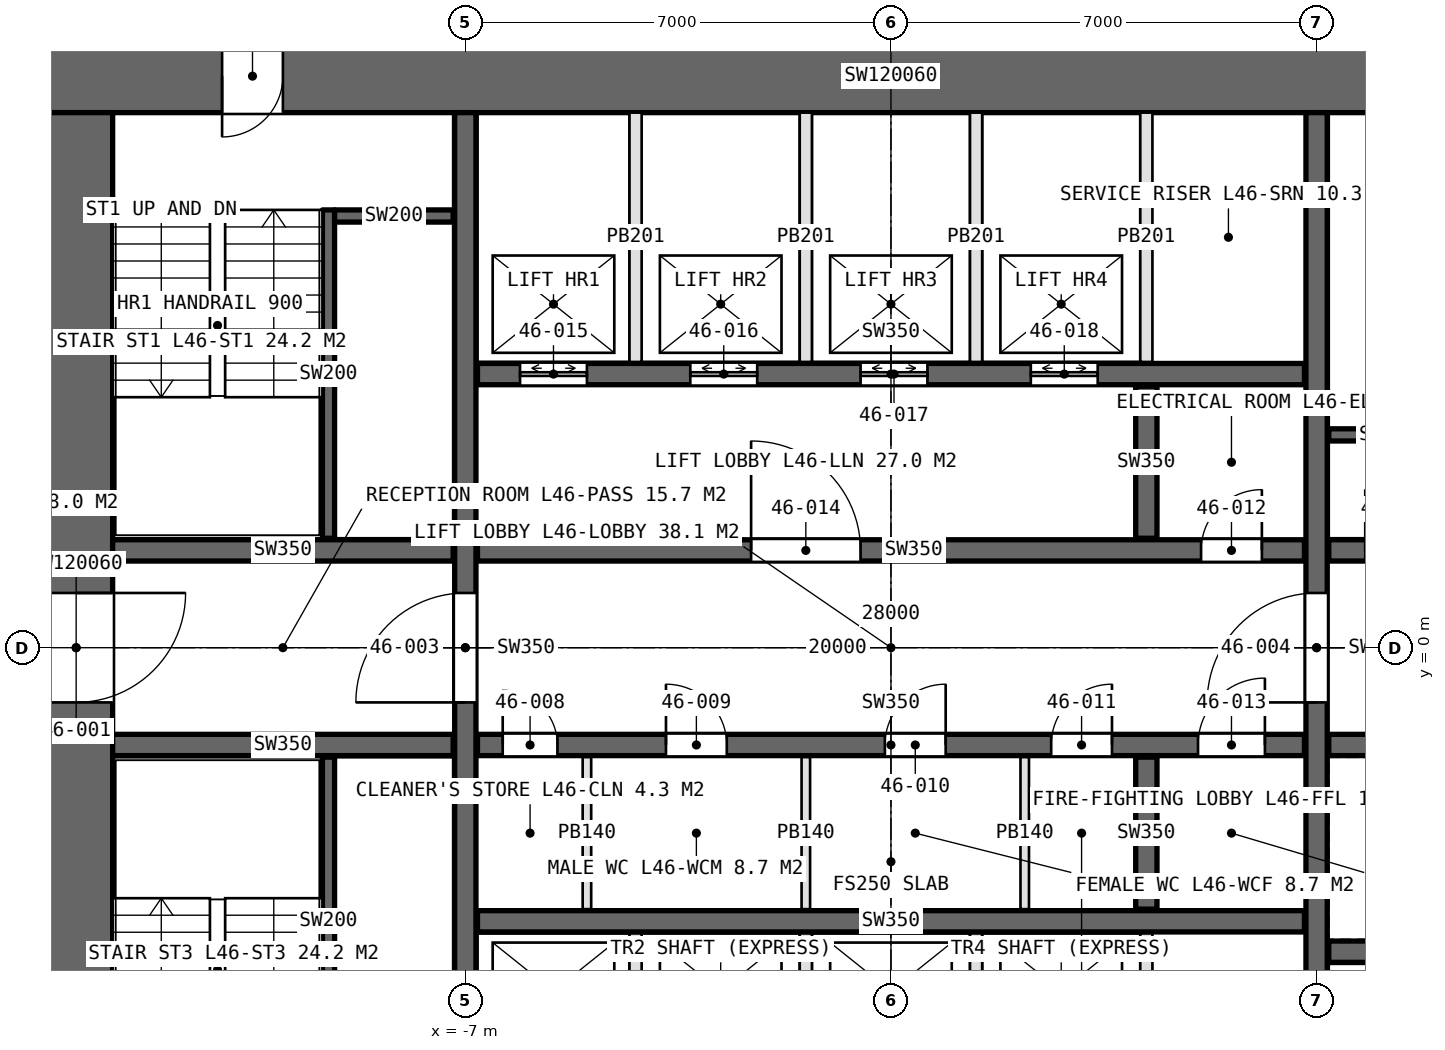
"""IFC4 building model, lengths in metres.
Left out: names, types, materials, properties, quantities, classifications, styles, units other than length and angle.
Written with IfcOpenShell. Run it as: python <this file> out.ifc"""

import sys

from ifc_helpers import new_model, si_unit, direction, frame, frame_2d, origin, place, context, subcontext, project, spatial, rectangle, extrude, element, fill, save


model = new_model("IFC4")
c1 = context("Model", 3, precision=1e-05, world=origin(), true_north=direction((0.0, 1.0)))
c2 = subcontext(c1, "Body", "Model", "MODEL_VIEW")
j1 = project(units=[si_unit("LENGTHUNIT", "METRE"), si_unit("PLANEANGLEUNIT", "RADIAN")], contexts=[c1])
p1 = place(None, origin())
s1 = spatial("IfcSite", under=j1, at=p1, CompositionType="ELEMENT")
p2 = place(p1, origin())
s2 = spatial("IfcBuilding", under=s1, at=p2, CompositionType="ELEMENT")
p3 = place(p2, frame((0.0, 0.0, 211.6)))
s3 = spatial("IfcBuildingStorey", under=s2, at=p3, CompositionType="ELEMENT", Elevation=211.6)
p4 = place(p3, frame((14.0, 9.4, 0.0), z_axis=(0.0, 0.0, 1.0), x_axis=(-1.0, 0.0, 0.0)))
e1 = element("IfcWall", 1, at=p4, inside=s3, PredefinedType="SHEAR", context=c2, shape_type="SweptSolid", body=[
    extrude(rectangle(XDim=28.0, YDim=1.2, at=frame_2d((14.0, 0.0))), origin(), (0.0, 0.0, 1.0), 4.2),
])
p5 = place(p4, frame((24.0, 0.0, 0.0)))
e2 = element("IfcOpeningElement", 2, at=p5, cuts=e1, PredefinedType="OPENING", context=c2, shape_type="SweptSolid", body=[
    extrude(rectangle(XDim=1.0, YDim=2.4, at=frame_2d((0.5, 1.2))), frame((0.0, 0.61, 0.0), z_axis=(0.0, -1.0, 0.0), x_axis=(1.0, 0.0, 0.0)), (0.0, 0.0, 1.0), 1.22),
])
p6 = place(p3, frame((-13.4, 8.8, 0.0), z_axis=(0.0, 0.0, 1.0), x_axis=(0.0, -1.0, 0.0)))
e3 = element("IfcWall", 3, at=p6, inside=s3, PredefinedType="SHEAR", context=c2, shape_type="SweptSolid", body=[
    extrude(rectangle(XDim=17.6, YDim=1.2, at=frame_2d((8.8, 0.0))), origin(), (0.0, 0.0, 1.0), 4.2),
])
p7 = place(p6, frame((7.9, 0.0, 0.0)))
e4 = element("IfcOpeningElement", 4, at=p7, cuts=e3, PredefinedType="OPENING", context=c2, shape_type="SweptSolid", body=[
    extrude(rectangle(XDim=1.8, YDim=2.4, at=frame_2d((0.9, 1.2))), frame((0.0, 0.61, 0.0), z_axis=(0.0, -1.0, 0.0), x_axis=(1.0, 0.0, 0.0)), (0.0, 0.0, 1.0), 1.22),
])
p8 = place(p6, frame((16.5, 0.0, 0.0)))
e5 = element("IfcOpeningElement", 5, at=p8, cuts=e3, PredefinedType="OPENING", context=c2, shape_type="SweptSolid", body=[
    extrude(rectangle(XDim=1.0, YDim=2.4, at=frame_2d((0.5, 1.2))), frame((0.0, 0.61, 0.0), z_axis=(0.0, -1.0, 0.0), x_axis=(1.0, 0.0, 0.0)), (0.0, 0.0, 1.0), 1.22),
])
p9 = place(p3, frame((-7.0, -8.8, 0.0), z_axis=(0.0, 0.0, 1.0), x_axis=(0.0, 1.0, 0.0)))
e6 = element("IfcWall", 6, at=p9, inside=s3, PredefinedType="SHEAR", context=c2, shape_type="SweptSolid", body=[
    extrude(rectangle(XDim=17.6, YDim=0.35, at=frame_2d((8.8, 0.0))), origin(), (0.0, 0.0, 1.0), 4.2),
])
p10 = place(p9, frame((7.9, 0.0, 0.0)))
e7 = element("IfcOpeningElement", 7, at=p10, cuts=e6, PredefinedType="OPENING", context=c2, shape_type="SweptSolid", body=[
    extrude(rectangle(XDim=1.8, YDim=2.4, at=frame_2d((0.9, 1.2))), frame((0.0, 0.185, 0.0), z_axis=(0.0, -1.0, 0.0), x_axis=(1.0, 0.0, 0.0)), (0.0, 0.0, 1.0), 0.37),
])
p11 = place(p3, frame((7.0, -8.8, 0.0), z_axis=(0.0, 0.0, 1.0), x_axis=(0.0, 1.0, 0.0)))
e8 = element("IfcWall", 8, at=p11, inside=s3, PredefinedType="SHEAR", context=c2, shape_type="SweptSolid", body=[
    extrude(rectangle(XDim=17.6, YDim=0.35, at=frame_2d((8.8, 0.0))), origin(), (0.0, 0.0, 1.0), 4.2),
])
p12 = place(p11, frame((7.9, 0.0, 0.0)))
e9 = element("IfcOpeningElement", 9, at=p12, cuts=e8, PredefinedType="OPENING", context=c2, shape_type="SweptSolid", body=[
    extrude(rectangle(XDim=1.8, YDim=2.4, at=frame_2d((0.9, 1.2))), frame((0.0, 0.185, 0.0), z_axis=(0.0, -1.0, 0.0), x_axis=(1.0, 0.0, 0.0)), (0.0, 0.0, 1.0), 0.37),
])
p13 = place(p3, frame((-6.8, 1.6, 0.0), z_axis=(0.0, 0.0, 1.0), x_axis=(1.0, 0.0, 0.0)))
e10 = element("IfcWall", 10, at=p13, inside=s3, PredefinedType="SHEAR", context=c2, shape_type="SweptSolid", body=[
    extrude(rectangle(XDim=13.6, YDim=0.35, at=frame_2d((6.8, 0.0))), origin(), (0.0, 0.0, 1.0), 4.2),
])
p14 = place(p13, frame((11.9, 0.0, 0.0)))
e11 = element("IfcOpeningElement", 11, at=p14, cuts=e10, PredefinedType="OPENING", context=c2, shape_type="SweptSolid", body=[
    extrude(rectangle(XDim=1.0, YDim=2.4, at=frame_2d((0.5, 1.2))), frame((0.0, 0.185, 0.0), z_axis=(0.0, -1.0, 0.0), x_axis=(1.0, 0.0, 0.0)), (0.0, 0.0, 1.0), 0.37),
])
p15 = place(p13, frame((4.5, 0.0, 0.0)))
e12 = element("IfcOpeningElement", 12, at=p15, cuts=e10, PredefinedType="OPENING", context=c2, shape_type="SweptSolid", body=[
    extrude(rectangle(XDim=1.8, YDim=2.4, at=frame_2d((0.9, 1.2))), frame((0.0, 0.185, 0.0), z_axis=(0.0, -1.0, 0.0), x_axis=(1.0, 0.0, 0.0)), (0.0, 0.0, 1.0), 0.37),
])
p16 = place(p3, frame((-6.8, -1.6, 0.0), z_axis=(0.0, 0.0, 1.0), x_axis=(1.0, 0.0, 0.0)))
e13 = element("IfcWall", 13, at=p16, inside=s3, PredefinedType="SHEAR", context=c2, shape_type="SweptSolid", body=[
    extrude(rectangle(XDim=13.6, YDim=0.35, at=frame_2d((6.8, 0.0))), origin(), (0.0, 0.0, 1.0), 4.2),
])
p17 = place(p16, frame((0.415, 0.0, 0.0)))
e14 = element("IfcOpeningElement", 14, at=p17, cuts=e13, PredefinedType="OPENING", context=c2, shape_type="SweptSolid", body=[
    extrude(rectangle(XDim=0.9, YDim=2.4, at=frame_2d((0.45, 1.2))), frame((0.0, 0.185, 0.0), z_axis=(0.0, -1.0, 0.0), x_axis=(1.0, 0.0, 0.0)), (0.0, 0.0, 1.0), 0.37),
])
p18 = place(p16, frame((3.1, 0.0, 0.0)))
e15 = element("IfcOpeningElement", 15, at=p18, cuts=e13, PredefinedType="OPENING", context=c2, shape_type="SweptSolid", body=[
    extrude(rectangle(XDim=1.0, YDim=2.4, at=frame_2d((0.5, 1.2))), frame((0.0, 0.185, 0.0), z_axis=(0.0, -1.0, 0.0), x_axis=(1.0, 0.0, 0.0)), (0.0, 0.0, 1.0), 0.37),
])
p19 = place(p16, frame((6.7, 0.0, 0.0)))
e16 = element("IfcOpeningElement", 16, at=p19, cuts=e13, PredefinedType="OPENING", context=c2, shape_type="SweptSolid", body=[
    extrude(rectangle(XDim=1.0, YDim=2.4, at=frame_2d((0.5, 1.2))), frame((0.0, 0.185, 0.0), z_axis=(0.0, -1.0, 0.0), x_axis=(1.0, 0.0, 0.0)), (0.0, 0.0, 1.0), 0.37),
])
p20 = place(p16, frame((9.435, 0.0, 0.0)))
e17 = element("IfcOpeningElement", 17, at=p20, cuts=e13, PredefinedType="OPENING", context=c2, shape_type="SweptSolid", body=[
    extrude(rectangle(XDim=1.0, YDim=2.4, at=frame_2d((0.5, 1.2))), frame((0.0, 0.185, 0.0), z_axis=(0.0, -1.0, 0.0), x_axis=(1.0, 0.0, 0.0)), (0.0, 0.0, 1.0), 0.37),
])
p21 = place(p16, frame((11.85, 0.0, 0.0)))
e18 = element("IfcOpeningElement", 18, at=p21, cuts=e13, PredefinedType="OPENING", context=c2, shape_type="SweptSolid", body=[
    extrude(rectangle(XDim=1.1, YDim=2.4, at=frame_2d((0.55, 1.2))), frame((0.0, 0.185, 0.0), z_axis=(0.0, -1.0, 0.0), x_axis=(1.0, 0.0, 0.0)), (0.0, 0.0, 1.0), 0.37),
])
p22 = place(p3, frame((-6.8, 4.5, 0.0), z_axis=(0.0, 0.0, 1.0), x_axis=(1.0, 0.0, 0.0)))
e19 = element("IfcWall", 19, at=p22, inside=s3, PredefinedType="SHEAR", context=c2, shape_type="SweptSolid", body=[
    extrude(rectangle(XDim=13.6, YDim=0.35, at=frame_2d((6.8, 0.0))), origin(), (0.0, 0.0, 1.0), 4.2),
])
p23 = place(p22, frame((0.7, 0.0, 0.0)))
e20 = element("IfcOpeningElement", 20, at=p23, cuts=e19, PredefinedType="OPENING", context=c2, shape_type="SweptSolid", body=[
    extrude(rectangle(XDim=1.1, YDim=2.4, at=frame_2d((0.55, 1.2))), frame((0.0, 0.185, 0.0), z_axis=(0.0, -1.0, 0.0), x_axis=(1.0, 0.0, 0.0)), (0.0, 0.0, 1.0), 0.37),
])
p24 = place(p22, frame((3.5, 0.0, 0.0)))
e21 = element("IfcOpeningElement", 21, at=p24, cuts=e19, PredefinedType="OPENING", context=c2, shape_type="SweptSolid", body=[
    extrude(rectangle(XDim=1.1, YDim=2.4, at=frame_2d((0.55, 1.2))), frame((0.0, 0.185, 0.0), z_axis=(0.0, -1.0, 0.0), x_axis=(1.0, 0.0, 0.0)), (0.0, 0.0, 1.0), 0.37),
])
p25 = place(p22, frame((6.3, 0.0, 0.0)))
e22 = element("IfcOpeningElement", 22, at=p25, cuts=e19, PredefinedType="OPENING", context=c2, shape_type="SweptSolid", body=[
    extrude(rectangle(XDim=1.1, YDim=2.4, at=frame_2d((0.55, 1.2))), frame((0.0, 0.185, 0.0), z_axis=(0.0, -1.0, 0.0), x_axis=(1.0, 0.0, 0.0)), (0.0, 0.0, 1.0), 0.37),
])
p26 = place(p22, frame((9.1, 0.0, 0.0)))
e23 = element("IfcOpeningElement", 23, at=p26, cuts=e19, PredefinedType="OPENING", context=c2, shape_type="SweptSolid", body=[
    extrude(rectangle(XDim=1.1, YDim=2.4, at=frame_2d((0.55, 1.2))), frame((0.0, 0.185, 0.0), z_axis=(0.0, -1.0, 0.0), x_axis=(1.0, 0.0, 0.0)), (0.0, 0.0, 1.0), 0.37),
])
p27 = place(p3, frame((-6.8, -4.5, 0.0), z_axis=(0.0, 0.0, 1.0), x_axis=(1.0, 0.0, 0.0)))
e24 = element("IfcWall", 24, at=p27, inside=s3, PredefinedType="SHEAR", context=c2, shape_type="SweptSolid", body=[
    extrude(rectangle(XDim=13.6, YDim=0.35, at=frame_2d((6.8, 0.0))), origin(), (0.0, 0.0, 1.0), 4.2),
])
for number, where, z_axis, x_axis in (
    (25, (-12.8, 1.6, 0.0), (0.0, 0.0, 1.0), (1.0, 0.0, 0.0)),
    (26, (-12.8, -1.6, 0.0), (0.0, 0.0, 1.0), (1.0, 0.0, 0.0)),
):
    element("IfcWall", number, at=place(p3, frame(where, z_axis=z_axis, x_axis=x_axis)), inside=s3, PredefinedType="SHEAR", context=c2, shape_type="SweptSolid", body=[
        extrude(rectangle(XDim=5.6, YDim=0.35, at=frame_2d((2.8, 0.0))), origin(), (0.0, 0.0, 1.0), 4.2),
    ])
p28 = place(p3, frame((7.2, 1.6, 0.0), z_axis=(0.0, 0.0, 1.0), x_axis=(1.0, 0.0, 0.0)))
e27 = element("IfcWall", 27, at=p28, inside=s3, PredefinedType="SHEAR", context=c2, shape_type="SweptSolid", body=[
    extrude(rectangle(XDim=5.6, YDim=0.35, at=frame_2d((2.8, 0.0))), origin(), (0.0, 0.0, 1.0), 4.2),
])
p29 = place(p28, frame((0.6, 0.0, 0.0)))
e28 = element("IfcOpeningElement", 28, at=p29, cuts=e27, PredefinedType="OPENING", context=c2, shape_type="SweptSolid", body=[
    extrude(rectangle(XDim=1.0, YDim=2.4, at=frame_2d((0.5, 1.2))), frame((0.0, 0.185, 0.0), z_axis=(0.0, -1.0, 0.0), x_axis=(1.0, 0.0, 0.0)), (0.0, 0.0, 1.0), 0.37),
])
p30 = place(p3, frame((7.2, -1.6, 0.0), z_axis=(0.0, 0.0, 1.0), x_axis=(1.0, 0.0, 0.0)))
e29 = element("IfcWall", 29, at=p30, inside=s3, PredefinedType="SHEAR", context=c2, shape_type="SweptSolid", body=[
    extrude(rectangle(XDim=5.6, YDim=0.35, at=frame_2d((2.8, 0.0))), origin(), (0.0, 0.0, 1.0), 4.2),
])
p31 = place(p30, frame((0.9, 0.0, 0.0)))
e30 = element("IfcOpeningElement", 30, at=p31, cuts=e29, PredefinedType="OPENING", context=c2, shape_type="SweptSolid", body=[
    extrude(rectangle(XDim=1.3, YDim=2.4, at=frame_2d((0.65, 1.2))), frame((0.0, 0.185, 0.0), z_axis=(0.0, -1.0, 0.0), x_axis=(1.0, 0.0, 0.0)), (0.0, 0.0, 1.0), 0.37),
])
p32 = place(p30, frame((3.9, 0.0, 0.0)))
e31 = element("IfcOpeningElement", 31, at=p32, cuts=e29, PredefinedType="OPENING", context=c2, shape_type="SweptSolid", body=[
    extrude(rectangle(XDim=1.3, YDim=2.4, at=frame_2d((0.65, 1.2))), frame((0.0, 0.185, 0.0), z_axis=(0.0, -1.0, 0.0), x_axis=(1.0, 0.0, 0.0)), (0.0, 0.0, 1.0), 0.37),
])
p33 = place(p3, frame((7.2, -5.0, 0.0), z_axis=(0.0, 0.0, 1.0), x_axis=(1.0, 0.0, 0.0)))
e32 = element("IfcWall", 32, at=p33, inside=s3, PredefinedType="SHEAR", context=c2, shape_type="SweptSolid", body=[
    extrude(rectangle(XDim=5.6, YDim=0.35, at=frame_2d((2.8, 0.0))), origin(), (0.0, 0.0, 1.0), 4.2),
])
for number, where, z_axis, x_axis in (
    (33, (4.2, 1.8, 0.0), (0.0, 0.0, 1.0), (0.0, 1.0, 0.0)),
    (34, (4.2, -4.3, 0.0), (0.0, 0.0, 1.0), (0.0, 1.0, 0.0)),
):
    element("IfcWall", number, at=place(p3, frame(where, z_axis=z_axis, x_axis=x_axis)), inside=s3, PredefinedType="SHEAR", context=c2, shape_type="SweptSolid", body=[
        extrude(rectangle(XDim=2.5, YDim=0.35, at=frame_2d((1.25, 0.0))), origin(), (0.0, 0.0, 1.0), 4.2),
    ])
for number, where, z_axis, x_axis in (
    (35, (-5.0, -1.8, 0.0), (0.0, 0.0, 1.0), (0.0, -1.0, 0.0)),
    (36, (-1.4, -1.8, 0.0), (0.0, 0.0, 1.0), (0.0, -1.0, 0.0)),
    (37, (2.2, -1.8, 0.0), (0.0, 0.0, 1.0), (0.0, -1.0, 0.0)),
):
    element("IfcWall", number, at=place(p3, frame(where, z_axis=z_axis, x_axis=x_axis)), inside=s3, PredefinedType="PARTITIONING", context=c2, shape_type="SweptSolid", body=[
        extrude(rectangle(XDim=2.5, YDim=0.14, at=frame_2d((1.25, 0.0))), origin(), (0.0, 0.0, 1.0), 3.95),
    ])
for number, where, z_axis, x_axis in (
    (38, (-4.2, 4.7, 0.0), (0.0, 0.0, 1.0), (0.0, 1.0, 0.0)),
    (39, (-1.4, 4.7, 0.0), (0.0, 0.0, 1.0), (0.0, 1.0, 0.0)),
    (40, (1.4, 4.7, 0.0), (0.0, 0.0, 1.0), (0.0, 1.0, 0.0)),
    (41, (4.2, 4.7, 0.0), (0.0, 0.0, 1.0), (0.0, 1.0, 0.0)),
    (42, (-4.2, -4.7, 0.0), (0.0, 0.0, 1.0), (0.0, -1.0, 0.0)),
    (43, (-1.4, -4.7, 0.0), (0.0, 0.0, 1.0), (0.0, -1.0, 0.0)),
    (44, (1.4, -4.7, 0.0), (0.0, 0.0, 1.0), (0.0, -1.0, 0.0)),
    (45, (4.2, -4.7, 0.0), (0.0, 0.0, 1.0), (0.0, -1.0, 0.0)),
):
    element("IfcWall", number, at=place(p3, frame(where, z_axis=z_axis, x_axis=x_axis)), inside=s3, PredefinedType="PARTITIONING", context=c2, shape_type="SweptSolid", body=[
        extrude(rectangle(XDim=4.1, YDim=0.2, at=frame_2d((2.05, 0.0))), origin(), (0.0, 0.0, 1.0), 4.2),
    ])
p34 = place(p3, frame((-9.25, 7.2, 0.0), z_axis=(0.0, 0.0, 1.0), x_axis=(0.0, -1.0, 0.0)))
e46 = element("IfcWall", 46, at=p34, inside=s3, PredefinedType="SOLIDWALL", context=c2, shape_type="SweptSolid", body=[
    extrude(rectangle(XDim=5.4, YDim=0.2, at=frame_2d((2.7, 0.0))), origin(), (0.0, 0.0, 1.0), 4.2),
])
p35 = place(p3, frame((-9.15, 7.1, 0.0), z_axis=(0.0, 0.0, 1.0), x_axis=(1.0, 0.0, 0.0)))
e47 = element("IfcWall", 47, at=p35, inside=s3, PredefinedType="SOLIDWALL", context=c2, shape_type="SweptSolid", body=[
    extrude(rectangle(XDim=1.95, YDim=0.2, at=frame_2d((0.975, 0.0))), origin(), (0.0, 0.0, 1.0), 4.2),
])
p36 = place(p3, frame((-9.25, -7.2, 0.0), z_axis=(0.0, 0.0, 1.0), x_axis=(0.0, 1.0, 0.0)))
e48 = element("IfcWall", 48, at=p36, inside=s3, PredefinedType="SOLIDWALL", context=c2, shape_type="SweptSolid", body=[
    extrude(rectangle(XDim=5.4, YDim=0.2, at=frame_2d((2.7, 0.0))), origin(), (0.0, 0.0, 1.0), 4.2),
])
p37 = place(p3, frame((9.15, 3.5, 0.0), z_axis=(0.0, 0.0, 1.0), x_axis=(-1.0, 0.0, 0.0)))
e49 = element("IfcWall", 49, at=p37, inside=s3, PredefinedType="SOLIDWALL", context=c2, shape_type="SweptSolid", body=[
    extrude(rectangle(XDim=1.95, YDim=0.2, at=frame_2d((0.975, 0.0))), origin(), (0.0, 0.0, 1.0), 4.2),
])
p38 = place(p7, origin())
e50 = element("IfcDoor", 50, at=p38, inside=s3, OperationType="DOUBLE_DOOR_SINGLE_SWING", PredefinedType="DOOR", context=c2, shape_type="SweptSolid", body=[
    extrude(rectangle(XDim=1.8, YDim=2.4, at=frame_2d((0.9, 1.2))), frame((0.0, 0.025, 0.0), z_axis=(0.0, -1.0, 0.0), x_axis=(1.0, 0.0, 0.0)), (0.0, 0.0, 1.0), 0.05),
])
fill(e4, e50)
p39 = place(p10, origin())
e51 = element("IfcDoor", 51, at=p39, inside=s3, OperationType="DOUBLE_DOOR_SINGLE_SWING", PredefinedType="DOOR", context=c2, shape_type="SweptSolid", body=[
    extrude(rectangle(XDim=1.8, YDim=2.4, at=frame_2d((0.9, 1.2))), frame((0.0, 0.025, 0.0), z_axis=(0.0, -1.0, 0.0), x_axis=(1.0, 0.0, 0.0)), (0.0, 0.0, 1.0), 0.05),
])
fill(e7, e51)
p40 = place(p12, origin())
e52 = element("IfcDoor", 52, at=p40, inside=s3, OperationType="DOUBLE_DOOR_SINGLE_SWING", PredefinedType="DOOR", context=c2, shape_type="SweptSolid", body=[
    extrude(rectangle(XDim=1.8, YDim=2.4, at=frame_2d((0.9, 1.2))), frame((0.0, 0.025, 0.0), z_axis=(0.0, -1.0, 0.0), x_axis=(1.0, 0.0, 0.0)), (0.0, 0.0, 1.0), 0.05),
])
fill(e9, e52)
p41 = place(p5, origin())
e53 = element("IfcDoor", 53, at=p41, inside=s3, OperationType="SINGLE_SWING_RIGHT", PredefinedType="DOOR", context=c2, shape_type="SweptSolid", body=[
    extrude(rectangle(XDim=1.0, YDim=2.4, at=frame_2d((0.5, 1.2))), frame((0.0, 0.025, 0.0), z_axis=(0.0, -1.0, 0.0), x_axis=(1.0, 0.0, 0.0)), (0.0, 0.0, 1.0), 0.05),
])
fill(e2, e53)
p42 = place(p17, origin())
e54 = element("IfcDoor", 54, at=p42, inside=s3, OperationType="SINGLE_SWING_LEFT", PredefinedType="DOOR", context=c2, shape_type="SweptSolid", body=[
    extrude(rectangle(XDim=0.9, YDim=2.4, at=frame_2d((0.45, 1.2))), frame((0.0, 0.025, 0.0), z_axis=(0.0, -1.0, 0.0), x_axis=(1.0, 0.0, 0.0)), (0.0, 0.0, 1.0), 0.05),
])
fill(e14, e54)
p43 = place(p18, origin())
e55 = element("IfcDoor", 55, at=p43, inside=s3, OperationType="SINGLE_SWING_LEFT", PredefinedType="DOOR", context=c2, shape_type="SweptSolid", body=[
    extrude(rectangle(XDim=1.0, YDim=2.4, at=frame_2d((0.5, 1.2))), frame((0.0, 0.025, 0.0), z_axis=(0.0, -1.0, 0.0), x_axis=(1.0, 0.0, 0.0)), (0.0, 0.0, 1.0), 0.05),
])
fill(e15, e55)
p44 = place(p19, origin())
e56 = element("IfcDoor", 56, at=p44, inside=s3, OperationType="SINGLE_SWING_RIGHT", PredefinedType="DOOR", context=c2, shape_type="SweptSolid", body=[
    extrude(rectangle(XDim=1.0, YDim=2.4, at=frame_2d((0.5, 1.2))), frame((0.0, 0.025, 0.0), z_axis=(0.0, -1.0, 0.0), x_axis=(1.0, 0.0, 0.0)), (0.0, 0.0, 1.0), 0.05),
])
fill(e16, e56)
p45 = place(p20, origin())
e57 = element("IfcDoor", 57, at=p45, inside=s3, OperationType="SINGLE_SWING_RIGHT", PredefinedType="DOOR", context=c2, shape_type="SweptSolid", body=[
    extrude(rectangle(XDim=1.0, YDim=2.4, at=frame_2d((0.5, 1.2))), frame((0.0, 0.025, 0.0), z_axis=(0.0, -1.0, 0.0), x_axis=(1.0, 0.0, 0.0)), (0.0, 0.0, 1.0), 0.05),
])
fill(e17, e57)
p46 = place(p14, origin())
e58 = element("IfcDoor", 58, at=p46, inside=s3, OperationType="SINGLE_SWING_RIGHT", PredefinedType="DOOR", context=c2, shape_type="SweptSolid", body=[
    extrude(rectangle(XDim=1.0, YDim=2.4, at=frame_2d((0.5, 1.2))), frame((0.0, 0.025, 0.0), z_axis=(0.0, -1.0, 0.0), x_axis=(1.0, 0.0, 0.0)), (0.0, 0.0, 1.0), 0.05),
])
fill(e11, e58)
p47 = place(p21, origin())
e59 = element("IfcDoor", 59, at=p47, inside=s3, OperationType="SINGLE_SWING_RIGHT", PredefinedType="DOOR", context=c2, shape_type="SweptSolid", body=[
    extrude(rectangle(XDim=1.1, YDim=2.4, at=frame_2d((0.55, 1.2))), frame((0.0, 0.025, 0.0), z_axis=(0.0, -1.0, 0.0), x_axis=(1.0, 0.0, 0.0)), (0.0, 0.0, 1.0), 0.05),
])
fill(e18, e59)
p48 = place(p15, origin())
e60 = element("IfcDoor", 60, at=p48, inside=s3, OperationType="DOUBLE_DOOR_SINGLE_SWING", PredefinedType="DOOR", context=c2, shape_type="SweptSolid", body=[
    extrude(rectangle(XDim=1.8, YDim=2.4, at=frame_2d((0.9, 1.2))), frame((0.0, 0.025, 0.0), z_axis=(0.0, -1.0, 0.0), x_axis=(1.0, 0.0, 0.0)), (0.0, 0.0, 1.0), 0.05),
])
fill(e12, e60)
p49 = place(p23, origin())
e61 = element("IfcDoor", 61, at=p49, inside=s3, OperationType="DOUBLE_DOOR_SLIDING", PredefinedType="DOOR", context=c2, shape_type="SweptSolid", body=[
    extrude(rectangle(XDim=1.1, YDim=2.4, at=frame_2d((0.55, 1.2))), frame((0.0, 0.025, 0.0), z_axis=(0.0, -1.0, 0.0), x_axis=(1.0, 0.0, 0.0)), (0.0, 0.0, 1.0), 0.05),
])
fill(e20, e61)
p50 = place(p24, origin())
e62 = element("IfcDoor", 62, at=p50, inside=s3, OperationType="DOUBLE_DOOR_SLIDING", PredefinedType="DOOR", context=c2, shape_type="SweptSolid", body=[
    extrude(rectangle(XDim=1.1, YDim=2.4, at=frame_2d((0.55, 1.2))), frame((0.0, 0.025, 0.0), z_axis=(0.0, -1.0, 0.0), x_axis=(1.0, 0.0, 0.0)), (0.0, 0.0, 1.0), 0.05),
])
fill(e21, e62)
p51 = place(p25, origin())
e63 = element("IfcDoor", 63, at=p51, inside=s3, OperationType="DOUBLE_DOOR_SLIDING", PredefinedType="DOOR", context=c2, shape_type="SweptSolid", body=[
    extrude(rectangle(XDim=1.1, YDim=2.4, at=frame_2d((0.55, 1.2))), frame((0.0, 0.025, 0.0), z_axis=(0.0, -1.0, 0.0), x_axis=(1.0, 0.0, 0.0)), (0.0, 0.0, 1.0), 0.05),
])
fill(e22, e63)
p52 = place(p26, origin())
e64 = element("IfcDoor", 64, at=p52, inside=s3, OperationType="DOUBLE_DOOR_SLIDING", PredefinedType="DOOR", context=c2, shape_type="SweptSolid", body=[
    extrude(rectangle(XDim=1.1, YDim=2.4, at=frame_2d((0.55, 1.2))), frame((0.0, 0.025, 0.0), z_axis=(0.0, -1.0, 0.0), x_axis=(1.0, 0.0, 0.0)), (0.0, 0.0, 1.0), 0.05),
])
fill(e23, e64)
save(model, sys.argv[1])
